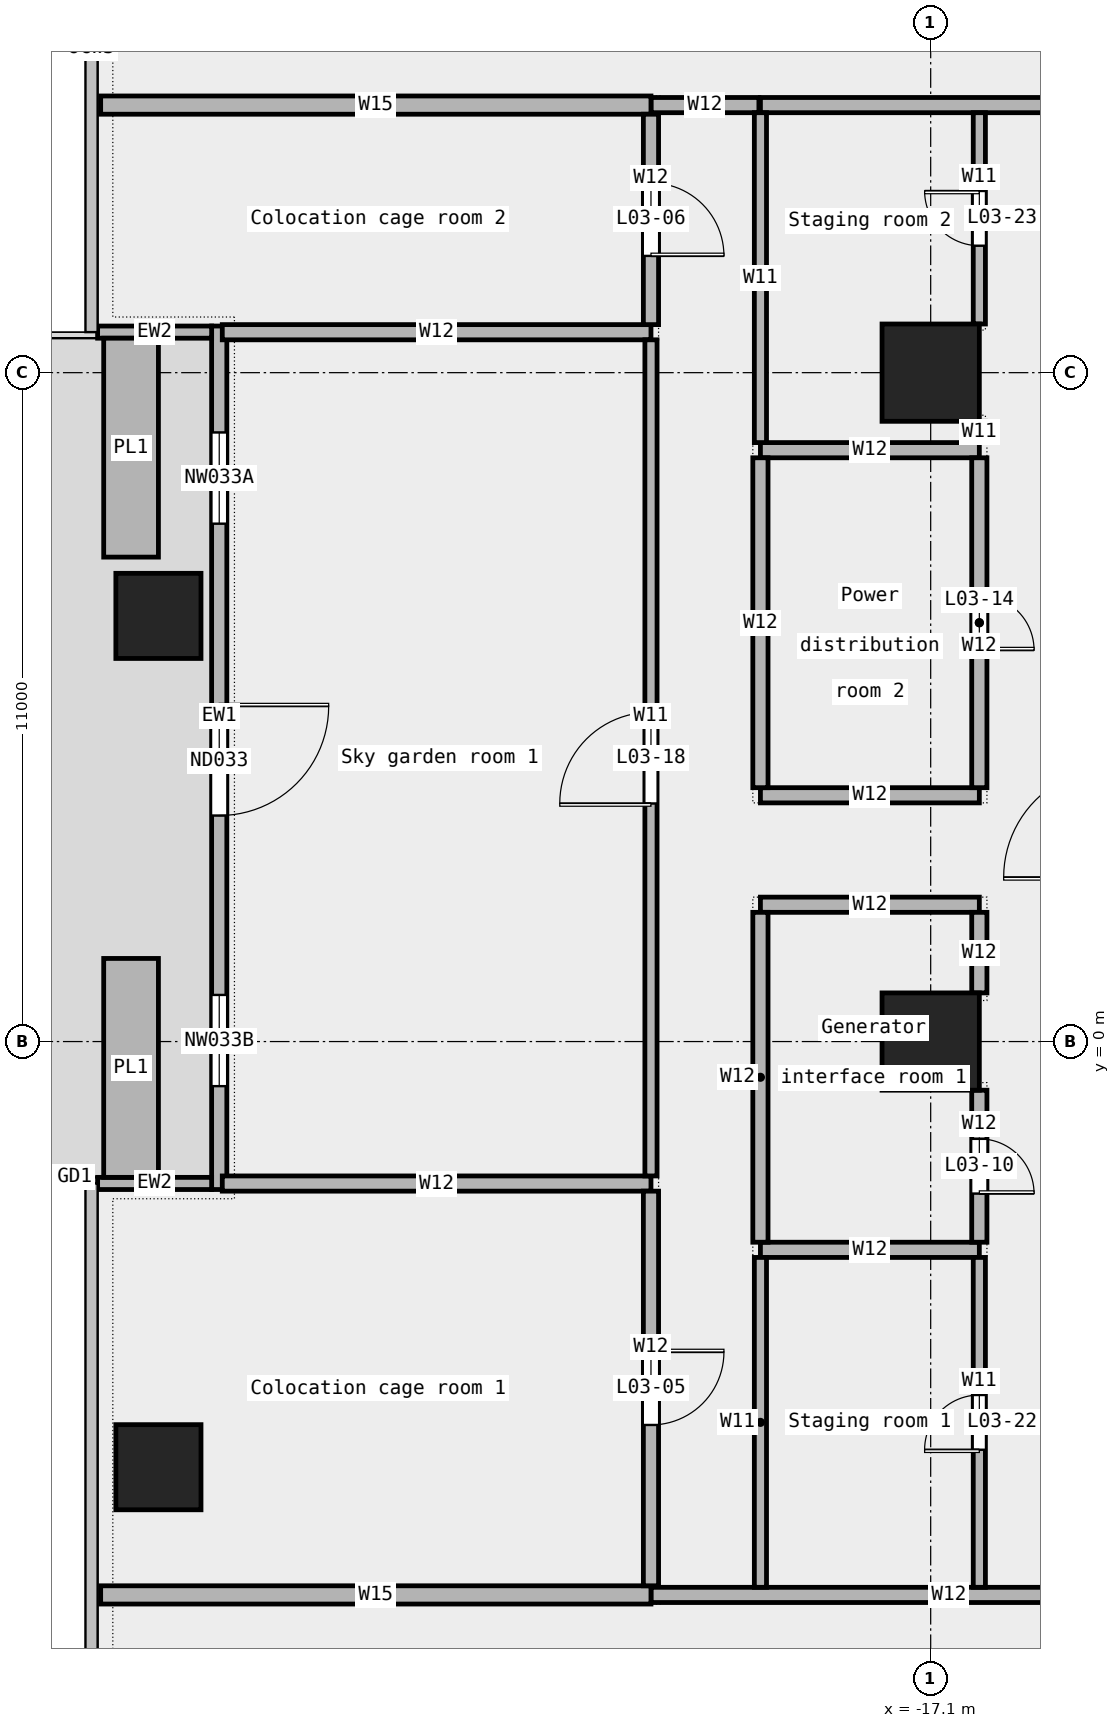
"""IFC4 building model, lengths in metres.
Left out: names, types, materials, properties, quantities, classifications, styles, units other than length and angle.
Written with IfcOpenShell. Run it as: python <this file> out.ifc"""

import sys

from ifc_helpers import new_model, si_unit, direction, frame, frame_2d, origin, origin_2d, place, context, subcontext, project, spatial, rectangle, extrude, element, fill, save


model = new_model("IFC4")
c1 = context("Model", 3, precision=1e-05, world=origin(), true_north=direction((0.0, 1.0)))
c2 = subcontext(c1, "Body", "Model", "MODEL_VIEW")
j1 = project(units=[si_unit("LENGTHUNIT", "METRE"), si_unit("PLANEANGLEUNIT", "RADIAN")], contexts=[c1])
p1 = place(None, origin())
s1 = spatial("IfcSite", under=j1, at=p1, CompositionType="ELEMENT")
p2 = place(p1, origin())
s2 = spatial("IfcBuilding", under=s1, at=p2, CompositionType="ELEMENT")
p3 = place(p2, frame((0.0, 0.0, 20.0)))
s3 = spatial("IfcBuildingStorey", under=s2, at=p3, CompositionType="ELEMENT", Elevation=20.0)
for number, where, z_axis, x_axis in (
    (1, (-29.8, 7.0, 0.0), (0.0, 0.0, 1.0), (1.0, 0.0, 0.0)),
    (2, (-29.8, -7.0, 0.0), (0.0, 0.0, 1.0), (1.0, 0.0, 0.0)),
):
    element("IfcColumn", number, at=place(p3, frame(where, z_axis=z_axis, x_axis=x_axis)), inside=s3, PredefinedType="COLUMN", context=c2, shape_type="SweptSolid", body=[
        extrude(rectangle(XDim=1.4, YDim=1.4, at=origin_2d()), origin(), (0.0, 0.0, 1.0), 5.0),
    ])
for number, where, z_axis, x_axis in (
    (3, (-17.1, 0.0, 0.0), (0.0, 0.0, 1.0), (1.0, 0.0, 0.0)),
    (4, (-17.1, 11.0, 0.0), (0.0, 0.0, 1.0), (1.0, 0.0, 0.0)),
):
    element("IfcColumn", number, at=place(p3, frame(where, z_axis=z_axis, x_axis=x_axis)), inside=s3, PredefinedType="COLUMN", context=c2, shape_type="SweptSolid", body=[
        extrude(rectangle(XDim=1.6, YDim=1.6, at=origin_2d()), origin(), (0.0, 0.0, 1.0), 5.0),
    ])
p4 = place(p3, frame((-28.8, 11.767, 0.0), z_axis=(0.0, 0.0, 1.0), x_axis=(0.0, -1.0, 0.0)))
e5 = element("IfcWall", 5, at=p4, inside=s3, PredefinedType="STANDARD", context=c2, shape_type="SweptSolid", body=[
    extrude(rectangle(XDim=14.2, YDim=0.25, at=frame_2d((7.1, 0.0))), origin(), (0.0, 0.0, 1.0), 5.0),
])
p5 = place(p4, frame((1.75, 0.0, 0.45)))
e6 = element("IfcOpeningElement", 6, at=p5, cuts=e5, PredefinedType="OPENING", context=c2, shape_type="SweptSolid", body=[
    extrude(rectangle(XDim=1.5, YDim=3.0, at=frame_2d((0.75, 1.5))), frame((0.0, 0.137, 0.0), z_axis=(0.0, -1.0, 0.0), x_axis=(1.0, 0.0, 0.0)), (0.0, 0.0, 1.0), 0.274),
])
p6 = place(p4, frame((6.25, 0.0, 0.0)))
e7 = element("IfcOpeningElement", 7, at=p6, cuts=e5, PredefinedType="OPENING", context=c2, shape_type="SweptSolid", body=[
    extrude(rectangle(XDim=1.8, YDim=2.4, at=frame_2d((0.9, 1.2))), frame((0.0, 0.137, 0.0), z_axis=(0.0, -1.0, 0.0), x_axis=(1.0, 0.0, 0.0)), (0.0, 0.0, 1.0), 0.274),
])
p7 = place(p4, frame((11.0, 0.0, 0.45)))
e8 = element("IfcOpeningElement", 8, at=p7, cuts=e5, PredefinedType="OPENING", context=c2, shape_type="SweptSolid", body=[
    extrude(rectangle(XDim=1.5, YDim=3.0, at=frame_2d((0.75, 1.5))), frame((0.0, 0.137, 0.0), z_axis=(0.0, -1.0, 0.0), x_axis=(1.0, 0.0, 0.0)), (0.0, 0.0, 1.0), 0.274),
])
for number, where, z_axis, x_axis in (
    (9, (-30.8, 11.667, 0.0), (0.0, 0.0, 1.0), (1.0, 0.0, 0.0)),
    (10, (-30.8, -2.333, 0.0), (0.0, 0.0, 1.0), (1.0, 0.0, 0.0)),
):
    element("IfcWall", number, at=place(p3, frame(where, z_axis=z_axis, x_axis=x_axis)), inside=s3, PredefinedType="STANDARD", context=c2, shape_type="SweptSolid", body=[
        extrude(rectangle(XDim=1.875, YDim=0.2, at=frame_2d((0.938, 0.0))), origin(), (0.0, 0.0, 1.0), 5.0),
    ])
for number, where, z_axis, x_axis in (
    (11, (-30.25, 11.567, 0.0), (0.0, 0.0, 1.0), (0.0, -1.0, 0.0)),
    (12, (-30.25, 1.367, 0.0), (0.0, 0.0, 1.0), (0.0, -1.0, 0.0)),
):
    element("IfcWall", number, at=place(p3, frame(where, z_axis=z_axis, x_axis=x_axis)), inside=s3, PredefinedType="STANDARD", context=c2, shape_type="SweptSolid", body=[
        extrude(rectangle(XDim=3.6, YDim=0.9, at=frame_2d((1.8, 0.0))), origin(), (0.0, 0.0, 1.0), 0.7),
    ])
p8 = place(p3, frame((-21.7, -9.1, 0.0), z_axis=(0.0, 0.0, 1.0), x_axis=(1.0, 0.0, 0.0)))
e13 = element("IfcWall", 13, at=p8, inside=s3, PredefinedType="PARTITIONING", context=c2, shape_type="SweptSolid", body=[
    extrude(rectangle(XDim=9.8, YDim=0.25, at=frame_2d((4.9, 0.0))), origin(), (0.0, 0.0, 1.0), 5.0),
])
p9 = place(p3, frame((-30.75, -9.1, 0.0), z_axis=(0.0, 0.0, 1.0), x_axis=(1.0, 0.0, 0.0)))
e14 = element("IfcWall", 14, at=p9, inside=s3, PredefinedType="PARTITIONING", context=c2, shape_type="SweptSolid", body=[
    extrude(rectangle(XDim=9.05, YDim=0.3, at=frame_2d((4.525, 0.0))), origin(), (0.0, 0.0, 1.0), 5.0),
])
p10 = place(p3, frame((-19.9, -3.425, 0.0), z_axis=(0.0, 0.0, 1.0), x_axis=(1.0, 0.0, 0.0)))
e15 = element("IfcWall", 15, at=p10, inside=s3, PredefinedType="PARTITIONING", context=c2, shape_type="SweptSolid", body=[
    extrude(rectangle(XDim=3.6, YDim=0.25, at=frame_2d((1.8, 0.0))), origin(), (0.0, 0.0, 1.0), 5.0),
])
p11 = place(p3, frame((-28.75, -2.335, 0.0), z_axis=(0.0, 0.0, 1.0), x_axis=(1.0, 0.0, 0.0)))
e16 = element("IfcWall", 16, at=p11, inside=s3, PredefinedType="PARTITIONING", context=c2, shape_type="SweptSolid", body=[
    extrude(rectangle(XDim=7.05, YDim=0.25, at=frame_2d((3.525, 0.0))), origin(), (0.0, 0.0, 1.0), 5.0),
])
for number, where, z_axis, x_axis in (
    (17, (-19.9, 2.25, 0.0), (0.0, 0.0, 1.0), (1.0, 0.0, 0.0)),
    (18, (-19.9, 4.05, 0.0), (0.0, 0.0, 1.0), (1.0, 0.0, 0.0)),
    (19, (-19.9, 9.725, 0.0), (0.0, 0.0, 1.0), (1.0, 0.0, 0.0)),
):
    element("IfcWall", number, at=place(p3, frame(where, z_axis=z_axis, x_axis=x_axis)), inside=s3, PredefinedType="PARTITIONING", context=c2, shape_type="SweptSolid", body=[
        extrude(rectangle(XDim=3.6, YDim=0.25, at=frame_2d((1.8, 0.0))), origin(), (0.0, 0.0, 1.0), 5.0),
    ])
p12 = place(p3, frame((-28.75, 11.665, 0.0), z_axis=(0.0, 0.0, 1.0), x_axis=(1.0, 0.0, 0.0)))
e20 = element("IfcWall", 20, at=p12, inside=s3, PredefinedType="PARTITIONING", context=c2, shape_type="SweptSolid", body=[
    extrude(rectangle(XDim=7.05, YDim=0.25, at=frame_2d((3.525, 0.0))), origin(), (0.0, 0.0, 1.0), 5.0),
])
p13 = place(p3, frame((-21.7, 15.4, 0.0), z_axis=(0.0, 0.0, 1.0), x_axis=(1.0, 0.0, 0.0)))
e21 = element("IfcWall", 21, at=p13, inside=s3, PredefinedType="PARTITIONING", context=c2, shape_type="SweptSolid", body=[
    extrude(rectangle(XDim=1.775, YDim=0.25, at=frame_2d((0.887, 0.0))), origin(), (0.0, 0.0, 1.0), 5.0),
])
p14 = place(p3, frame((-19.9, 15.4, 0.0), z_axis=(0.0, 0.0, 1.0), x_axis=(1.0, 0.0, 0.0)))
e22 = element("IfcWall", 22, at=p14, inside=s3, PredefinedType="PARTITIONING", context=c2, shape_type="SweptSolid", body=[
    extrude(rectangle(XDim=13.26, YDim=0.25, at=frame_2d((6.63, 0.0))), origin(), (0.0, 0.0, 1.0), 5.0),
])
p15 = place(p14, frame((7.53, 0.0, 0.0)))
e23 = element("IfcOpeningElement", 23, at=p15, cuts=e22, PredefinedType="OPENING", context=c2, shape_type="SweptSolid", body=[
    extrude(rectangle(XDim=1.8, YDim=2.1, at=frame_2d((0.9, 1.05))), frame((0.0, 0.137, 0.0), z_axis=(0.0, -1.0, 0.0), x_axis=(1.0, 0.0, 0.0)), (0.0, 0.0, 1.0), 0.274),
])
p16 = place(p3, frame((-30.75, 15.4, 0.0), z_axis=(0.0, 0.0, 1.0), x_axis=(1.0, 0.0, 0.0)))
e24 = element("IfcWall", 24, at=p16, inside=s3, PredefinedType="PARTITIONING", context=c2, shape_type="SweptSolid", body=[
    extrude(rectangle(XDim=9.05, YDim=0.3, at=frame_2d((4.525, 0.0))), origin(), (0.0, 0.0, 1.0), 5.0),
])
p17 = place(p3, frame((-21.7, -2.21, 0.0), z_axis=(0.0, 0.0, 1.0), x_axis=(0.0, 1.0, 0.0)))
e25 = element("IfcWall", 25, at=p17, inside=s3, PredefinedType="PARTITIONING", context=c2, shape_type="SweptSolid", body=[
    extrude(rectangle(XDim=13.75, YDim=0.2, at=frame_2d((6.875, 0.0))), origin(), (0.0, 0.0, 1.0), 5.0),
])
p18 = place(p17, frame((6.125, 0.0, 0.0)))
e26 = element("IfcOpeningElement", 26, at=p18, cuts=e25, PredefinedType="OPENING", context=c2, shape_type="SweptSolid", body=[
    extrude(rectangle(XDim=1.5, YDim=2.1, at=frame_2d((0.75, 1.05))), frame((0.0, 0.112, 0.0), z_axis=(0.0, -1.0, 0.0), x_axis=(1.0, 0.0, 0.0)), (0.0, 0.0, 1.0), 0.224),
])
p19 = place(p3, frame((-21.7, -8.95, 0.0), z_axis=(0.0, 0.0, 1.0), x_axis=(0.0, 1.0, 0.0)))
e27 = element("IfcWall", 27, at=p19, inside=s3, PredefinedType="PARTITIONING", context=c2, shape_type="SweptSolid", body=[
    extrude(rectangle(XDim=6.49, YDim=0.25, at=frame_2d((3.245, 0.0))), origin(), (0.0, 0.0, 1.0), 5.0),
])
p20 = place(p19, frame((2.645, 0.0, 0.0)))
e28 = element("IfcOpeningElement", 28, at=p20, cuts=e27, PredefinedType="OPENING", context=c2, shape_type="SweptSolid", body=[
    extrude(rectangle(XDim=1.2, YDim=2.1, at=frame_2d((0.6, 1.05))), frame((0.0, 0.137, 0.0), z_axis=(0.0, -1.0, 0.0), x_axis=(1.0, 0.0, 0.0)), (0.0, 0.0, 1.0), 0.274),
])
p21 = place(p3, frame((-21.7, 11.79, 0.0), z_axis=(0.0, 0.0, 1.0), x_axis=(0.0, 1.0, 0.0)))
e29 = element("IfcWall", 29, at=p21, inside=s3, PredefinedType="PARTITIONING", context=c2, shape_type="SweptSolid", body=[
    extrude(rectangle(XDim=3.46, YDim=0.25, at=frame_2d((1.73, 0.0))), origin(), (0.0, 0.0, 1.0), 5.0),
])
p22 = place(p21, frame((1.13, 0.0, 0.0)))
e30 = element("IfcOpeningElement", 30, at=p22, cuts=e29, PredefinedType="OPENING", context=c2, shape_type="SweptSolid", body=[
    extrude(rectangle(XDim=1.2, YDim=2.1, at=frame_2d((0.6, 1.05))), frame((0.0, 0.137, 0.0), z_axis=(0.0, -1.0, 0.0), x_axis=(1.0, 0.0, 0.0)), (0.0, 0.0, 1.0), 0.274),
])
p23 = place(p3, frame((-19.9, -8.975, 0.0), z_axis=(0.0, 0.0, 1.0), x_axis=(0.0, 1.0, 0.0)))
e31 = element("IfcWall", 31, at=p23, inside=s3, PredefinedType="PARTITIONING", context=c2, shape_type="SweptSolid", body=[
    extrude(rectangle(XDim=5.425, YDim=0.2, at=frame_2d((2.712, 0.0))), origin(), (0.0, 0.0, 1.0), 5.0),
])
p24 = place(p3, frame((-19.9, 9.85, 0.0), z_axis=(0.0, 0.0, 1.0), x_axis=(0.0, 1.0, 0.0)))
e32 = element("IfcWall", 32, at=p24, inside=s3, PredefinedType="PARTITIONING", context=c2, shape_type="SweptSolid", body=[
    extrude(rectangle(XDim=5.425, YDim=0.2, at=frame_2d((2.712, 0.0))), origin(), (0.0, 0.0, 1.0), 5.0),
])
for number, where, z_axis, x_axis in (
    (33, (-19.9, -3.3, 0.0), (0.0, 0.0, 1.0), (0.0, 1.0, 0.0)),
    (34, (-19.9, 4.175, 0.0), (0.0, 0.0, 1.0), (0.0, 1.0, 0.0)),
):
    element("IfcWall", number, at=place(p3, frame(where, z_axis=z_axis, x_axis=x_axis)), inside=s3, PredefinedType="PARTITIONING", context=c2, shape_type="SweptSolid", body=[
        extrude(rectangle(XDim=5.425, YDim=0.25, at=frame_2d((2.712, 0.0))), origin(), (0.0, 0.0, 1.0), 5.0),
    ])
p25 = place(p3, frame((-16.3, -8.975, 0.0), z_axis=(0.0, 0.0, 1.0), x_axis=(0.0, 1.0, 0.0)))
e35 = element("IfcWall", 35, at=p25, inside=s3, PredefinedType="PARTITIONING", context=c2, shape_type="SweptSolid", body=[
    extrude(rectangle(XDim=5.425, YDim=0.2, at=frame_2d((2.712, 0.0))), origin(), (0.0, 0.0, 1.0), 5.0),
])
p26 = place(p25, frame((2.262, 0.0, 0.0)))
e36 = element("IfcOpeningElement", 36, at=p26, cuts=e35, PredefinedType="OPENING", context=c2, shape_type="SweptSolid", body=[
    extrude(rectangle(XDim=0.9, YDim=2.1, at=frame_2d((0.45, 1.05))), frame((0.0, 0.112, 0.0), z_axis=(0.0, -1.0, 0.0), x_axis=(1.0, 0.0, 0.0)), (0.0, 0.0, 1.0), 0.224),
])
p27 = place(p3, frame((-16.3, 9.85, 0.0), z_axis=(0.0, 0.0, 1.0), x_axis=(0.0, 1.0, 0.0)))
e37 = element("IfcWall", 37, at=p27, inside=s3, PredefinedType="PARTITIONING", context=c2, shape_type="SweptSolid", body=[
    extrude(rectangle(XDim=0.35, YDim=0.2, at=frame_2d((0.175, 0.0))), origin(), (0.0, 0.0, 1.0), 5.0),
])
p28 = place(p3, frame((-16.3, 11.8, 0.0), z_axis=(0.0, 0.0, 1.0), x_axis=(0.0, 1.0, 0.0)))
e38 = element("IfcWall", 38, at=p28, inside=s3, PredefinedType="PARTITIONING", context=c2, shape_type="SweptSolid", body=[
    extrude(rectangle(XDim=3.475, YDim=0.2, at=frame_2d((1.737, 0.0))), origin(), (0.0, 0.0, 1.0), 5.0),
])
p29 = place(p28, frame((1.288, 0.0, 0.0)))
e39 = element("IfcOpeningElement", 39, at=p29, cuts=e38, PredefinedType="OPENING", context=c2, shape_type="SweptSolid", body=[
    extrude(rectangle(XDim=0.9, YDim=2.1, at=frame_2d((0.45, 1.05))), frame((0.0, 0.112, 0.0), z_axis=(0.0, -1.0, 0.0), x_axis=(1.0, 0.0, 0.0)), (0.0, 0.0, 1.0), 0.224),
])
p30 = place(p3, frame((-16.3, -3.3, 0.0), z_axis=(0.0, 0.0, 1.0), x_axis=(0.0, 1.0, 0.0)))
e40 = element("IfcWall", 40, at=p30, inside=s3, PredefinedType="PARTITIONING", context=c2, shape_type="SweptSolid", body=[
    extrude(rectangle(XDim=2.5, YDim=0.25, at=frame_2d((1.25, 0.0))), origin(), (0.0, 0.0, 1.0), 5.0),
])
p31 = place(p30, frame((0.8, 0.0, 0.0)))
e41 = element("IfcOpeningElement", 41, at=p31, cuts=e40, PredefinedType="OPENING", context=c2, shape_type="SweptSolid", body=[
    extrude(rectangle(XDim=0.9, YDim=2.1, at=frame_2d((0.45, 1.05))), frame((0.0, 0.137, 0.0), z_axis=(0.0, -1.0, 0.0), x_axis=(1.0, 0.0, 0.0)), (0.0, 0.0, 1.0), 0.274),
])
p32 = place(p3, frame((-16.3, 0.8, 0.0), z_axis=(0.0, 0.0, 1.0), x_axis=(0.0, 1.0, 0.0)))
e42 = element("IfcWall", 42, at=p32, inside=s3, PredefinedType="PARTITIONING", context=c2, shape_type="SweptSolid", body=[
    extrude(rectangle(XDim=1.325, YDim=0.25, at=frame_2d((0.663, 0.0))), origin(), (0.0, 0.0, 1.0), 5.0),
])
p33 = place(p3, frame((-16.3, 4.175, 0.0), z_axis=(0.0, 0.0, 1.0), x_axis=(0.0, 1.0, 0.0)))
e43 = element("IfcWall", 43, at=p33, inside=s3, PredefinedType="PARTITIONING", context=c2, shape_type="SweptSolid", body=[
    extrude(rectangle(XDim=5.425, YDim=0.25, at=frame_2d((2.712, 0.0))), origin(), (0.0, 0.0, 1.0), 5.0),
])
p34 = place(p33, frame((2.262, 0.0, 0.0)))
e44 = element("IfcOpeningElement", 44, at=p34, cuts=e43, PredefinedType="OPENING", context=c2, shape_type="SweptSolid", body=[
    extrude(rectangle(XDim=0.9, YDim=2.1, at=frame_2d((0.45, 1.05))), frame((0.0, 0.137, 0.0), z_axis=(0.0, -1.0, 0.0), x_axis=(1.0, 0.0, 0.0)), (0.0, 0.0, 1.0), 0.274),
])
p35 = place(p5, origin())
e45 = element("IfcWindow", 45, at=p35, inside=s3, PartitioningType="SINGLE_PANEL", PredefinedType="WINDOW", context=c2, shape_type="SweptSolid", body=[
    extrude(rectangle(XDim=1.5, YDim=3.0, at=frame_2d((0.75, 1.5))), frame((0.0, 0.03, 0.0), z_axis=(0.0, -1.0, 0.0), x_axis=(1.0, 0.0, 0.0)), (0.0, 0.0, 1.0), 0.06),
])
fill(e6, e45)
p36 = place(p6, origin())
e46 = element("IfcDoor", 46, at=p36, inside=s3, OperationType="DOUBLE_DOOR_SINGLE_SWING", PredefinedType="DOOR", context=c2, shape_type="SweptSolid", body=[
    extrude(rectangle(XDim=1.8, YDim=2.4, at=frame_2d((0.9, 1.2))), frame((0.0, 0.025, 0.0), z_axis=(0.0, -1.0, 0.0), x_axis=(1.0, 0.0, 0.0)), (0.0, 0.0, 1.0), 0.05),
])
fill(e7, e46)
p37 = place(p7, origin())
e47 = element("IfcWindow", 47, at=p37, inside=s3, PartitioningType="SINGLE_PANEL", PredefinedType="WINDOW", context=c2, shape_type="SweptSolid", body=[
    extrude(rectangle(XDim=1.5, YDim=3.0, at=frame_2d((0.75, 1.5))), frame((0.0, 0.03, 0.0), z_axis=(0.0, -1.0, 0.0), x_axis=(1.0, 0.0, 0.0)), (0.0, 0.0, 1.0), 0.06),
])
fill(e8, e47)
p38 = place(p20, origin())
e48 = element("IfcDoor", 48, at=p38, inside=s3, OperationType="SINGLE_SWING_LEFT", PredefinedType="DOOR", context=c2, shape_type="SweptSolid", body=[
    extrude(rectangle(XDim=1.2, YDim=2.1, at=frame_2d((0.6, 1.05))), frame((0.0, 0.025, 0.0), z_axis=(0.0, -1.0, 0.0), x_axis=(1.0, 0.0, 0.0)), (0.0, 0.0, 1.0), 0.05),
])
fill(e28, e48)
p39 = place(p22, origin())
e49 = element("IfcDoor", 49, at=p39, inside=s3, OperationType="SINGLE_SWING_RIGHT", PredefinedType="DOOR", context=c2, shape_type="SweptSolid", body=[
    extrude(rectangle(XDim=1.2, YDim=2.1, at=frame_2d((0.6, 1.05))), frame((0.0, 0.025, 0.0), z_axis=(0.0, -1.0, 0.0), x_axis=(1.0, 0.0, 0.0)), (0.0, 0.0, 1.0), 0.05),
])
fill(e30, e49)
p40 = place(p31, origin())
e50 = element("IfcDoor", 50, at=p40, inside=s3, OperationType="SINGLE_SWING_RIGHT", PredefinedType="DOOR", context=c2, shape_type="SweptSolid", body=[
    extrude(rectangle(XDim=0.9, YDim=2.1, at=frame_2d((0.45, 1.05))), frame((0.0, 0.025, 0.0), z_axis=(0.0, -1.0, 0.0), x_axis=(1.0, 0.0, 0.0)), (0.0, 0.0, 1.0), 0.05),
])
fill(e41, e50)
p41 = place(p34, origin())
e51 = element("IfcDoor", 51, at=p41, inside=s3, OperationType="SINGLE_SWING_RIGHT", PredefinedType="DOOR", context=c2, shape_type="SweptSolid", body=[
    extrude(rectangle(XDim=0.9, YDim=2.1, at=frame_2d((0.45, 1.05))), frame((0.0, 0.025, 0.0), z_axis=(0.0, -1.0, 0.0), x_axis=(1.0, 0.0, 0.0)), (0.0, 0.0, 1.0), 0.05),
])
fill(e44, e51)
p42 = place(p18, origin())
e52 = element("IfcDoor", 52, at=p42, inside=s3, OperationType="DOUBLE_DOOR_SINGLE_SWING", PredefinedType="DOOR", context=c2, shape_type="SweptSolid", body=[
    extrude(rectangle(XDim=1.5, YDim=2.1, at=frame_2d((0.75, 1.05))), frame((0.0, 0.025, 0.0), z_axis=(0.0, -1.0, 0.0), x_axis=(1.0, 0.0, 0.0)), (0.0, 0.0, 1.0), 0.05),
])
fill(e26, e52)
p43 = place(p26, origin())
e53 = element("IfcDoor", 53, at=p43, inside=s3, OperationType="SINGLE_SWING_LEFT", PredefinedType="DOOR", context=c2, shape_type="SweptSolid", body=[
    extrude(rectangle(XDim=0.9, YDim=2.1, at=frame_2d((0.45, 1.05))), frame((0.0, 0.025, 0.0), z_axis=(0.0, -1.0, 0.0), x_axis=(1.0, 0.0, 0.0)), (0.0, 0.0, 1.0), 0.05),
])
fill(e36, e53)
p44 = place(p29, origin())
e54 = element("IfcDoor", 54, at=p44, inside=s3, OperationType="SINGLE_SWING_RIGHT", PredefinedType="DOOR", context=c2, shape_type="SweptSolid", body=[
    extrude(rectangle(XDim=0.9, YDim=2.1, at=frame_2d((0.45, 1.05))), frame((0.0, 0.025, 0.0), z_axis=(0.0, -1.0, 0.0), x_axis=(1.0, 0.0, 0.0)), (0.0, 0.0, 1.0), 0.05),
])
fill(e39, e54)
save(model, sys.argv[1])
